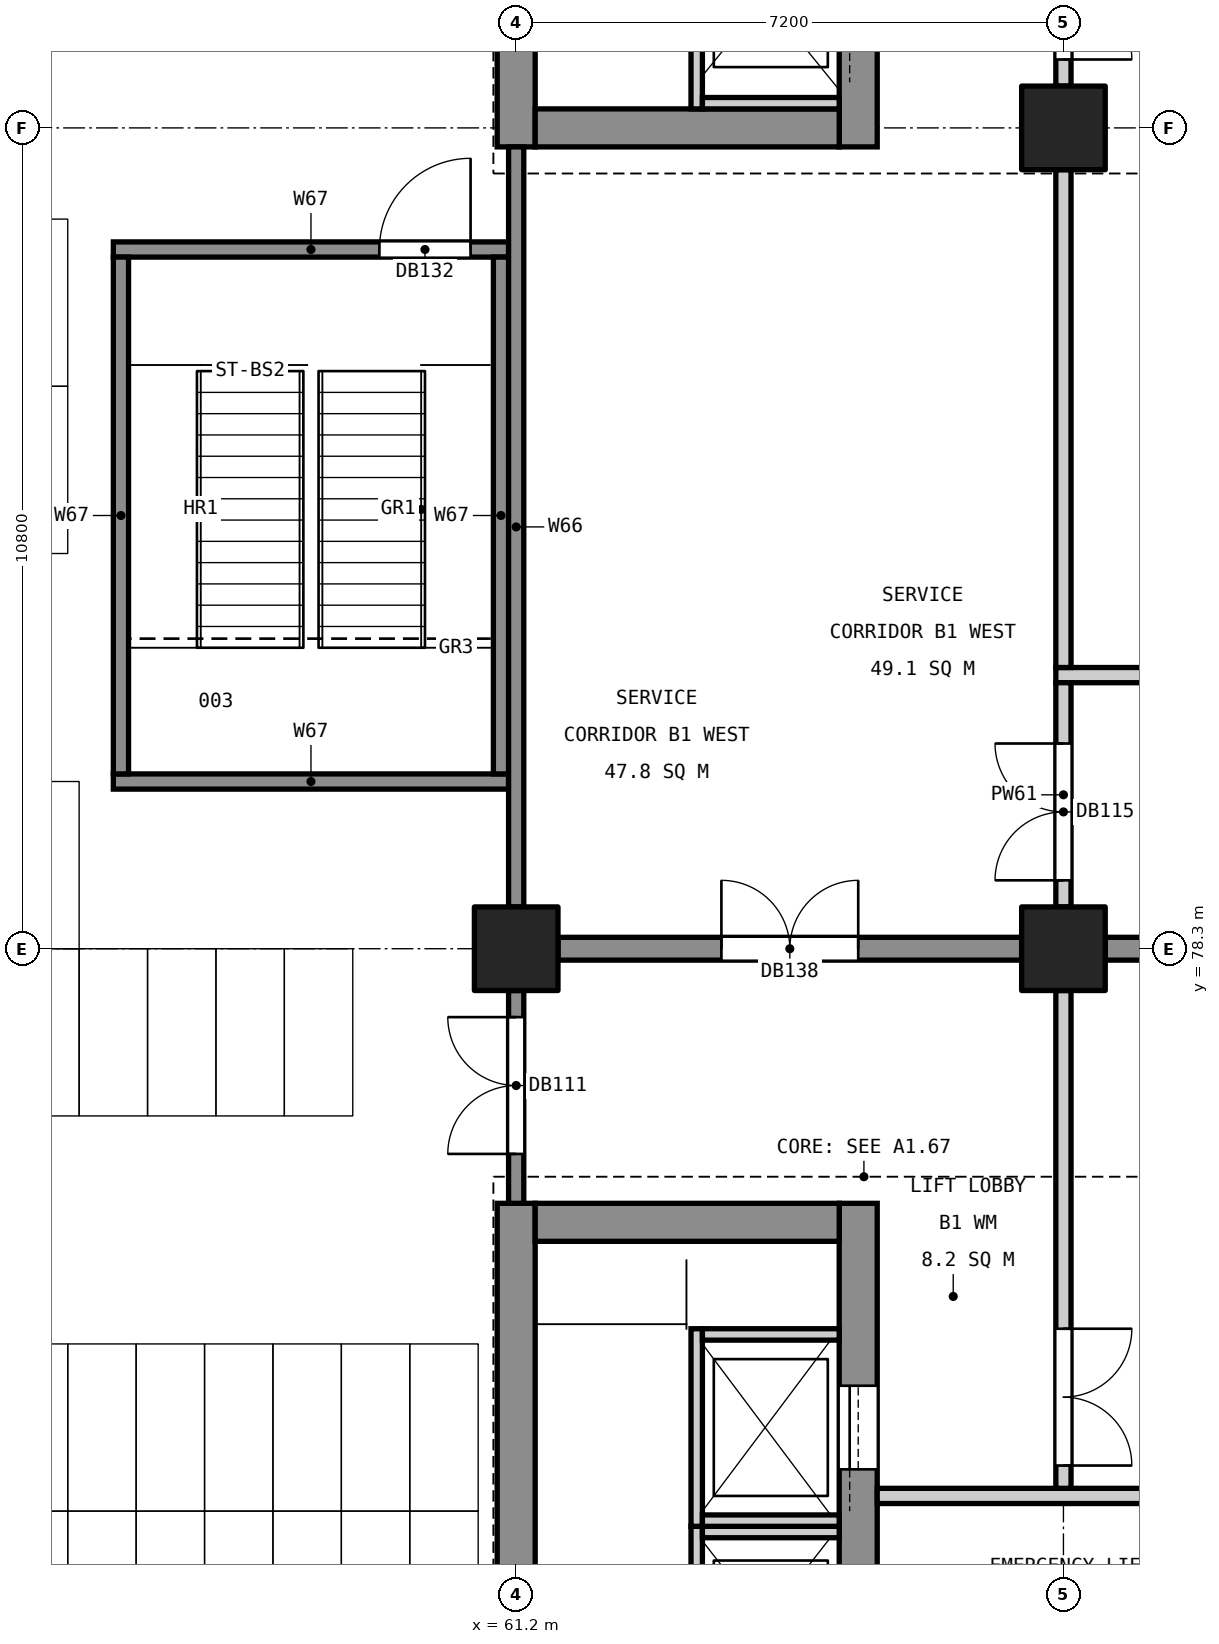
"""IFC4 building model, lengths in metres.
Left out: names, types, materials, properties, quantities, classifications, styles, units other than length and angle.
Written with IfcOpenShell. Run it as: python <this file> out.ifc"""

import sys

from ifc_helpers import new_model, si_unit, direction, frame, frame_2d, origin, origin_2d, place, context, subcontext, project, spatial, rectangle, extrude, element, fill, save


model = new_model("IFC4")
c1 = context("Model", 3, precision=1e-05, world=origin(), true_north=direction((0.0, 1.0)))
c2 = subcontext(c1, "Body", "Model", "MODEL_VIEW")
j1 = project(units=[si_unit("LENGTHUNIT", "METRE"), si_unit("PLANEANGLEUNIT", "RADIAN")], contexts=[c1])
p1 = place(None, origin())
s1 = spatial("IfcSite", under=j1, at=p1, CompositionType="ELEMENT")
p2 = place(p1, origin())
s2 = spatial("IfcBuilding", under=s1, at=p2, CompositionType="ELEMENT")
p3 = place(p2, frame((0.0, 0.0, -4.8)))
s3 = spatial("IfcBuildingStorey", under=s2, at=p3, CompositionType="ELEMENT", Elevation=-4.8)
for number, where, z_axis, x_axis in (
    (1, (61.2, 78.3, 0.0), (0.0, 0.0, 1.0), (1.0, 0.0, 0.0)),
    (2, (68.4, 78.3, 0.0), (0.0, 0.0, 1.0), (1.0, 0.0, 0.0)),
    (3, (68.4, 89.1, 0.0), (0.0, 0.0, 1.0), (1.0, 0.0, 0.0)),
):
    element("IfcColumn", number, at=place(p3, frame(where, z_axis=z_axis, x_axis=x_axis)), inside=s3, PredefinedType="COLUMN", context=c2, shape_type="SweptSolid", body=[
        extrude(rectangle(XDim=1.1, YDim=1.1, at=origin_2d()), origin(), (0.0, 0.0, 1.0), 4.5),
    ])
p4 = place(p3, frame((61.2, 60.05, 0.0), z_axis=(0.0, 0.0, 1.0), x_axis=(0.0, 1.0, 0.0)))
e4 = element("IfcWall", 4, at=p4, inside=s3, PredefinedType="SHEAR", context=c2, shape_type="SweptSolid", body=[
    extrude(rectangle(XDim=14.9, YDim=0.5, at=frame_2d((7.45, 0.0))), origin(), (0.0, 0.0, 1.0), 4.5),
])
p5 = place(p3, frame((65.7, 60.05, 0.0), z_axis=(0.0, 0.0, 1.0), x_axis=(0.0, 1.0, 0.0)))
e5 = element("IfcWall", 5, at=p5, inside=s3, PredefinedType="SHEAR", context=c2, shape_type="SweptSolid", body=[
    extrude(rectangle(XDim=14.9, YDim=0.5, at=frame_2d((7.45, 0.0))), origin(), (0.0, 0.0, 1.0), 4.5),
])
p6 = place(p5, frame((8.85, 0.0, 0.0)))
e6 = element("IfcOpeningElement", 6, at=p6, cuts=e5, PredefinedType="OPENING", context=c2, shape_type="SweptSolid", body=[
    extrude(rectangle(XDim=1.1, YDim=2.1, at=frame_2d((0.55, 1.05))), frame((0.0, 0.26, 0.0), z_axis=(0.0, -1.0, 0.0), x_axis=(1.0, 0.0, 0.0)), (0.0, 0.0, 1.0), 0.52),
])
p7 = place(p5, frame((11.4, 0.0, 0.0)))
e7 = element("IfcOpeningElement", 7, at=p7, cuts=e5, PredefinedType="OPENING", context=c2, shape_type="SweptSolid", body=[
    extrude(rectangle(XDim=1.1, YDim=2.1, at=frame_2d((0.55, 1.05))), frame((0.0, 0.26, 0.0), z_axis=(0.0, -1.0, 0.0), x_axis=(1.0, 0.0, 0.0)), (0.0, 0.0, 1.0), 0.52),
])
p8 = place(p5, frame((3.75, 0.0, 0.0)))
e8 = element("IfcOpeningElement", 8, at=p8, cuts=e5, PredefinedType="OPENING", context=c2, shape_type="SweptSolid", body=[
    extrude(rectangle(XDim=1.0, YDim=2.1, at=frame_2d((0.5, 1.05))), frame((0.0, 0.26, 0.0), z_axis=(0.0, -1.0, 0.0), x_axis=(1.0, 0.0, 0.0)), (0.0, 0.0, 1.0), 0.52),
])
p9 = place(p3, frame((61.45, 74.7, 0.0), z_axis=(0.0, 0.0, 1.0), x_axis=(1.0, 0.0, 0.0)))
e9 = element("IfcWall", 9, at=p9, inside=s3, PredefinedType="SHEAR", context=c2, shape_type="SweptSolid", body=[
    extrude(rectangle(XDim=4.0, YDim=0.5, at=frame_2d((2.0, 0.0))), origin(), (0.0, 0.0, 1.0), 4.5),
])
p10 = place(p3, frame((61.2, 88.85, 0.0), z_axis=(0.0, 0.0, 1.0), x_axis=(0.0, 1.0, 0.0)))
e10 = element("IfcWall", 10, at=p10, inside=s3, PredefinedType="SHEAR", context=c2, shape_type="SweptSolid", body=[
    extrude(rectangle(XDim=11.3, YDim=0.5, at=frame_2d((5.65, 0.0))), origin(), (0.0, 0.0, 1.0), 4.5),
])
p11 = place(p3, frame((65.7, 88.85, 0.0), z_axis=(0.0, 0.0, 1.0), x_axis=(0.0, 1.0, 0.0)))
e11 = element("IfcWall", 11, at=p11, inside=s3, PredefinedType="SHEAR", context=c2, shape_type="SweptSolid", body=[
    extrude(rectangle(XDim=11.3, YDim=0.5, at=frame_2d((5.65, 0.0))), origin(), (0.0, 0.0, 1.0), 4.5),
])
p12 = place(p11, frame((1.4, 0.0, 0.0)))
e12 = element("IfcOpeningElement", 12, at=p12, cuts=e11, PredefinedType="OPENING", context=c2, shape_type="SweptSolid", body=[
    extrude(rectangle(XDim=1.1, YDim=2.1, at=frame_2d((0.55, 1.05))), frame((0.0, 0.26, 0.0), z_axis=(0.0, -1.0, 0.0), x_axis=(1.0, 0.0, 0.0)), (0.0, 0.0, 1.0), 0.52),
])
p13 = place(p11, frame((6.55, 0.0, 0.0)))
e13 = element("IfcOpeningElement", 13, at=p13, cuts=e11, PredefinedType="OPENING", context=c2, shape_type="SweptSolid", body=[
    extrude(rectangle(XDim=1.0, YDim=2.1, at=frame_2d((0.5, 1.05))), frame((0.0, 0.26, 0.0), z_axis=(0.0, -1.0, 0.0), x_axis=(1.0, 0.0, 0.0)), (0.0, 0.0, 1.0), 0.52),
])
p14 = place(p3, frame((61.45, 89.1, 0.0), z_axis=(0.0, 0.0, 1.0), x_axis=(1.0, 0.0, 0.0)))
e14 = element("IfcWall", 14, at=p14, inside=s3, PredefinedType="SHEAR", context=c2, shape_type="SweptSolid", body=[
    extrude(rectangle(XDim=4.0, YDim=0.5, at=frame_2d((2.0, 0.0))), origin(), (0.0, 0.0, 1.0), 4.5),
])
p15 = place(p3, frame((61.75, 78.3, 0.0), z_axis=(0.0, 0.0, 1.0), x_axis=(1.0, 0.0, 0.0)))
e15 = element("IfcWall", 15, at=p15, inside=s3, PredefinedType="SHEAR", context=c2, shape_type="SweptSolid", body=[
    extrude(rectangle(XDim=6.1, YDim=0.3, at=frame_2d((3.05, 0.0))), origin(), (0.0, 0.0, 1.0), 4.5),
])
p16 = place(p15, frame((2.15, 0.0, 0.0)))
e16 = element("IfcOpeningElement", 16, at=p16, cuts=e15, PredefinedType="OPENING", context=c2, shape_type="SweptSolid", body=[
    extrude(rectangle(XDim=1.8, YDim=2.1, at=frame_2d((0.9, 1.05))), frame((0.0, 0.16, 0.0), z_axis=(0.0, -1.0, 0.0), x_axis=(1.0, 0.0, 0.0)), (0.0, 0.0, 1.0), 0.32),
])
p17 = place(p3, frame((68.95, 78.3, 0.0), z_axis=(0.0, 0.0, 1.0), x_axis=(1.0, 0.0, 0.0)))
e17 = element("IfcWall", 17, at=p17, inside=s3, PredefinedType="SHEAR", context=c2, shape_type="SweptSolid", body=[
    extrude(rectangle(XDim=9.7, YDim=0.3, at=frame_2d((4.85, 0.0))), origin(), (0.0, 0.0, 1.0), 4.5),
])
p18 = place(p3, frame((63.575, 68.2, 0.0), z_axis=(0.0, 0.0, 1.0), x_axis=(0.0, 1.0, 0.0)))
e18 = element("IfcWall", 18, at=p18, inside=s3, PredefinedType="SOLIDWALL", context=c2, shape_type="SweptSolid", body=[
    extrude(rectangle(XDim=2.5, YDim=0.15, at=frame_2d((1.25, 0.0))), origin(), (0.0, 0.0, 1.0), 4.8),
])
p19 = place(p3, frame((63.65, 70.625, 0.0), z_axis=(0.0, 0.0, 1.0), x_axis=(1.0, 0.0, 0.0)))
e19 = element("IfcWall", 19, at=p19, inside=s3, PredefinedType="SOLIDWALL", context=c2, shape_type="SweptSolid", body=[
    extrude(rectangle(XDim=1.8, YDim=0.15, at=frame_2d((0.9, 0.0))), origin(), (0.0, 0.0, 1.0), 4.8),
])
p20 = place(p3, frame((63.575, 70.7, 0.0), z_axis=(0.0, 0.0, 1.0), x_axis=(0.0, 1.0, 0.0)))
e20 = element("IfcWall", 20, at=p20, inside=s3, PredefinedType="SOLIDWALL", context=c2, shape_type="SweptSolid", body=[
    extrude(rectangle(XDim=2.6, YDim=0.15, at=frame_2d((1.3, 0.0))), origin(), (0.0, 0.0, 1.0), 4.8),
])
for number, where, z_axis, x_axis in (
    (21, (63.65, 70.775, 0.0), (0.0, 0.0, 1.0), (1.0, 0.0, 0.0)),
    (22, (63.65, 73.225, 0.0), (0.0, 0.0, 1.0), (1.0, 0.0, 0.0)),
):
    element("IfcWall", number, at=place(p3, frame(where, z_axis=z_axis, x_axis=x_axis)), inside=s3, PredefinedType="SOLIDWALL", context=c2, shape_type="SweptSolid", body=[
        extrude(rectangle(XDim=1.8, YDim=0.15, at=frame_2d((0.9, 0.0))), origin(), (0.0, 0.0, 1.0), 4.8),
    ])
p21 = place(p3, frame((63.575, 92.0, 0.0), z_axis=(0.0, 0.0, 1.0), x_axis=(0.0, -1.0, 0.0)))
e23 = element("IfcWall", 23, at=p21, inside=s3, PredefinedType="SOLIDWALL", context=c2, shape_type="SweptSolid", body=[
    extrude(rectangle(XDim=2.65, YDim=0.15, at=frame_2d((1.325, 0.0))), origin(), (0.0, 0.0, 1.0), 4.8),
])
p22 = place(p3, frame((63.65, 89.425, 0.0), z_axis=(0.0, 0.0, 1.0), x_axis=(1.0, 0.0, 0.0)))
e24 = element("IfcWall", 24, at=p22, inside=s3, PredefinedType="SOLIDWALL", context=c2, shape_type="SweptSolid", body=[
    extrude(rectangle(XDim=1.8, YDim=0.15, at=frame_2d((0.9, 0.0))), origin(), (0.0, 0.0, 1.0), 4.8),
])
p23 = place(p3, frame((65.95, 71.1, 0.0), z_axis=(0.0, 0.0, 1.0), x_axis=(1.0, 0.0, 0.0)))
e25 = element("IfcWall", 25, at=p23, inside=s3, PredefinedType="PARTITIONING", context=c2, shape_type="SweptSolid", body=[
    extrude(rectangle(XDim=4.3, YDim=0.2, at=frame_2d((2.15, 0.0))), origin(), (0.0, 0.0, 1.0), 3.7),
])
p24 = place(p3, frame((55.9, 80.5, 0.0), z_axis=(0.0, 0.0, 1.0), x_axis=(1.0, 0.0, 0.0)))
e26 = element("IfcWall", 26, at=p24, inside=s3, PredefinedType="SOLIDWALL", context=c2, shape_type="SweptSolid", body=[
    extrude(rectangle(XDim=5.2, YDim=0.2, at=frame_2d((2.6, 0.0))), origin(), (0.0, 0.0, 1.0), 4.35),
])
p25 = place(p3, frame((68.3, 81.9, 0.0), z_axis=(0.0, 0.0, 1.0), x_axis=(1.0, 0.0, 0.0)))
e27 = element("IfcWall", 27, at=p25, inside=s3, PredefinedType="PARTITIONING", context=c2, shape_type="SweptSolid", body=[
    extrude(rectangle(XDim=11.0, YDim=0.2, at=frame_2d((5.5, 0.0))), origin(), (0.0, 0.0, 1.0), 3.7),
])
p26 = place(p3, frame((55.9, 87.5, 0.0), z_axis=(0.0, 0.0, 1.0), x_axis=(1.0, 0.0, 0.0)))
e28 = element("IfcWall", 28, at=p26, inside=s3, PredefinedType="SOLIDWALL", context=c2, shape_type="SweptSolid", body=[
    extrude(rectangle(XDim=5.2, YDim=0.2, at=frame_2d((2.6, 0.0))), origin(), (0.0, 0.0, 1.0), 4.35),
])
p27 = place(p26, frame((3.5, 0.0, 0.0)))
e29 = element("IfcOpeningElement", 29, at=p27, cuts=e28, PredefinedType="OPENING", context=c2, shape_type="SweptSolid", body=[
    extrude(rectangle(XDim=1.2, YDim=2.1, at=frame_2d((0.6, 1.05))), frame((0.0, 0.11, 0.0), z_axis=(0.0, -1.0, 0.0), x_axis=(1.0, 0.0, 0.0)), (0.0, 0.0, 1.0), 0.22),
])
p28 = place(p3, frame((56.0, 80.6, 0.0), z_axis=(0.0, 0.0, 1.0), x_axis=(0.0, 1.0, 0.0)))
e30 = element("IfcWall", 30, at=p28, inside=s3, PredefinedType="SOLIDWALL", context=c2, shape_type="SweptSolid", body=[
    extrude(rectangle(XDim=6.8, YDim=0.2, at=frame_2d((3.4, 0.0))), origin(), (0.0, 0.0, 1.0), 4.35),
])
p29 = place(p3, frame((61.0, 80.6, 0.0), z_axis=(0.0, 0.0, 1.0), x_axis=(0.0, 1.0, 0.0)))
e31 = element("IfcWall", 31, at=p29, inside=s3, PredefinedType="SOLIDWALL", context=c2, shape_type="SweptSolid", body=[
    extrude(rectangle(XDim=6.8, YDim=0.2, at=frame_2d((3.4, 0.0))), origin(), (0.0, 0.0, 1.0), 4.5),
])
p30 = place(p3, frame((61.2, 74.95, 0.0), z_axis=(0.0, 0.0, 1.0), x_axis=(0.0, 1.0, 0.0)))
e32 = element("IfcWall", 32, at=p30, inside=s3, PredefinedType="SOLIDWALL", context=c2, shape_type="SweptSolid", body=[
    extrude(rectangle(XDim=2.8, YDim=0.2, at=frame_2d((1.4, 0.0))), origin(), (0.0, 0.0, 1.0), 4.5),
])
p31 = place(p30, frame((0.65, 0.0, 0.0)))
e33 = element("IfcOpeningElement", 33, at=p31, cuts=e32, PredefinedType="OPENING", context=c2, shape_type="SweptSolid", body=[
    extrude(rectangle(XDim=1.8, YDim=2.1, at=frame_2d((0.9, 1.05))), frame((0.0, 0.11, 0.0), z_axis=(0.0, -1.0, 0.0), x_axis=(1.0, 0.0, 0.0)), (0.0, 0.0, 1.0), 0.22),
])
p32 = place(p3, frame((61.2, 78.85, 0.0), z_axis=(0.0, 0.0, 1.0), x_axis=(0.0, 1.0, 0.0)))
e34 = element("IfcWall", 34, at=p32, inside=s3, PredefinedType="SOLIDWALL", context=c2, shape_type="SweptSolid", body=[
    extrude(rectangle(XDim=10.0, YDim=0.2, at=frame_2d((5.0, 0.0))), origin(), (0.0, 0.0, 1.0), 4.5),
])
p33 = place(p3, frame((68.4, 71.2, 0.0), z_axis=(0.0, 0.0, 1.0), x_axis=(0.0, 1.0, 0.0)))
e35 = element("IfcWall", 35, at=p33, inside=s3, PredefinedType="PARTITIONING", context=c2, shape_type="SweptSolid", body=[
    extrude(rectangle(XDim=6.55, YDim=0.2, at=frame_2d((3.275, 0.0))), origin(), (0.0, 0.0, 1.0), 3.4),
])
p34 = place(p33, frame((0.3, 0.0, 0.0)))
e36 = element("IfcOpeningElement", 36, at=p34, cuts=e35, PredefinedType="OPENING", context=c2, shape_type="SweptSolid", body=[
    extrude(rectangle(XDim=1.8, YDim=2.1, at=frame_2d((0.9, 1.05))), frame((0.0, 0.11, 0.0), z_axis=(0.0, -1.0, 0.0), x_axis=(1.0, 0.0, 0.0)), (0.0, 0.0, 1.0), 0.22),
])
p35 = place(p3, frame((68.4, 78.85, 0.0), z_axis=(0.0, 0.0, 1.0), x_axis=(0.0, 1.0, 0.0)))
e37 = element("IfcWall", 37, at=p35, inside=s3, PredefinedType="PARTITIONING", context=c2, shape_type="SweptSolid", body=[
    extrude(rectangle(XDim=2.95, YDim=0.2, at=frame_2d((1.475, 0.0))), origin(), (0.0, 0.0, 1.0), 3.4),
])
p36 = place(p35, frame((0.35, 0.0, 0.0)))
e38 = element("IfcOpeningElement", 38, at=p36, cuts=e37, PredefinedType="OPENING", context=c2, shape_type="SweptSolid", body=[
    extrude(rectangle(XDim=1.8, YDim=2.1, at=frame_2d((0.9, 1.05))), frame((0.0, 0.11, 0.0), z_axis=(0.0, -1.0, 0.0), x_axis=(1.0, 0.0, 0.0)), (0.0, 0.0, 1.0), 0.22),
])
p37 = place(p3, frame((68.4, 82.0, 0.0), z_axis=(0.0, 0.0, 1.0), x_axis=(0.0, 1.0, 0.0)))
e39 = element("IfcWall", 39, at=p37, inside=s3, PredefinedType="PARTITIONING", context=c2, shape_type="SweptSolid", body=[
    extrude(rectangle(XDim=6.55, YDim=0.2, at=frame_2d((3.275, 0.0))), origin(), (0.0, 0.0, 1.0), 3.4),
])
p38 = place(p3, frame((68.4, 89.65, 0.0), z_axis=(0.0, 0.0, 1.0), x_axis=(0.0, 1.0, 0.0)))
e40 = element("IfcWall", 40, at=p38, inside=s3, PredefinedType="PARTITIONING", context=c2, shape_type="SweptSolid", body=[
    extrude(rectangle(XDim=9.7, YDim=0.2, at=frame_2d((4.85, 0.0))), origin(), (0.0, 0.0, 1.0), 3.4),
])
p39 = place(p38, frame((0.35, 0.0, 0.0)))
e41 = element("IfcOpeningElement", 41, at=p39, cuts=e40, PredefinedType="OPENING", context=c2, shape_type="SweptSolid", body=[
    extrude(rectangle(XDim=1.8, YDim=2.1, at=frame_2d((0.9, 1.05))), frame((0.0, 0.11, 0.0), z_axis=(0.0, -1.0, 0.0), x_axis=(1.0, 0.0, 0.0)), (0.0, 0.0, 1.0), 0.22),
])
p40 = place(p7, origin())
e42 = element("IfcDoor", 42, at=p40, inside=s3, OperationType="SLIDING_TO_LEFT", PredefinedType="DOOR", context=c2, shape_type="SweptSolid", body=[
    extrude(rectangle(XDim=1.1, YDim=2.1, at=frame_2d((0.55, 1.05))), frame((0.0, 0.025, 0.0), z_axis=(0.0, -1.0, 0.0), x_axis=(1.0, 0.0, 0.0)), (0.0, 0.0, 1.0), 0.05),
])
fill(e7, e42)
p41 = place(p34, frame((1.8, 0.0, 0.0), z_axis=(0.0, 0.0, 1.0), x_axis=(-1.0, 0.0, 0.0)))
e43 = element("IfcDoor", 43, at=p41, inside=s3, OperationType="DOUBLE_DOOR_SINGLE_SWING", PredefinedType="DOOR", context=c2, shape_type="SweptSolid", body=[
    extrude(rectangle(XDim=1.8, YDim=2.1, at=frame_2d((0.9, 1.05))), frame((0.0, 0.025, 0.0), z_axis=(0.0, -1.0, 0.0), x_axis=(1.0, 0.0, 0.0)), (0.0, 0.0, 1.0), 0.05),
])
fill(e36, e43)
p42 = place(p39, frame((1.8, 0.0, 0.0), z_axis=(0.0, 0.0, 1.0), x_axis=(-1.0, 0.0, 0.0)))
e44 = element("IfcDoor", 44, at=p42, inside=s3, OperationType="DOUBLE_DOOR_SINGLE_SWING", PredefinedType="DOOR", context=c2, shape_type="SweptSolid", body=[
    extrude(rectangle(XDim=1.8, YDim=2.1, at=frame_2d((0.9, 1.05))), frame((0.0, 0.025, 0.0), z_axis=(0.0, -1.0, 0.0), x_axis=(1.0, 0.0, 0.0)), (0.0, 0.0, 1.0), 0.05),
])
fill(e41, e44)
p43 = place(p31, origin())
e45 = element("IfcDoor", 45, at=p43, inside=s3, OperationType="DOUBLE_DOOR_SINGLE_SWING", PredefinedType="DOOR", context=c2, shape_type="SweptSolid", body=[
    extrude(rectangle(XDim=1.8, YDim=2.1, at=frame_2d((0.9, 1.05))), frame((0.0, 0.025, 0.0), z_axis=(0.0, -1.0, 0.0), x_axis=(1.0, 0.0, 0.0)), (0.0, 0.0, 1.0), 0.05),
])
fill(e33, e45)
p44 = place(p36, origin())
e46 = element("IfcDoor", 46, at=p44, inside=s3, OperationType="DOUBLE_DOOR_SINGLE_SWING", PredefinedType="DOOR", context=c2, shape_type="SweptSolid", body=[
    extrude(rectangle(XDim=1.8, YDim=2.1, at=frame_2d((0.9, 1.05))), frame((0.0, 0.025, 0.0), z_axis=(0.0, -1.0, 0.0), x_axis=(1.0, 0.0, 0.0)), (0.0, 0.0, 1.0), 0.05),
])
fill(e38, e46)
p45 = place(p27, origin())
e47 = element("IfcDoor", 47, at=p45, inside=s3, OperationType="SINGLE_SWING_RIGHT", PredefinedType="DOOR", context=c2, shape_type="SweptSolid", body=[
    extrude(rectangle(XDim=1.2, YDim=2.1, at=frame_2d((0.6, 1.05))), frame((0.0, 0.025, 0.0), z_axis=(0.0, -1.0, 0.0), x_axis=(1.0, 0.0, 0.0)), (0.0, 0.0, 1.0), 0.05),
])
fill(e29, e47)
p46 = place(p16, origin())
e48 = element("IfcDoor", 48, at=p46, inside=s3, OperationType="DOUBLE_DOOR_SINGLE_SWING", PredefinedType="DOOR", context=c2, shape_type="SweptSolid", body=[
    extrude(rectangle(XDim=1.8, YDim=2.1, at=frame_2d((0.9, 1.05))), frame((0.0, 0.025, 0.0), z_axis=(0.0, -1.0, 0.0), x_axis=(1.0, 0.0, 0.0)), (0.0, 0.0, 1.0), 0.05),
])
fill(e16, e48)
save(model, sys.argv[1])
